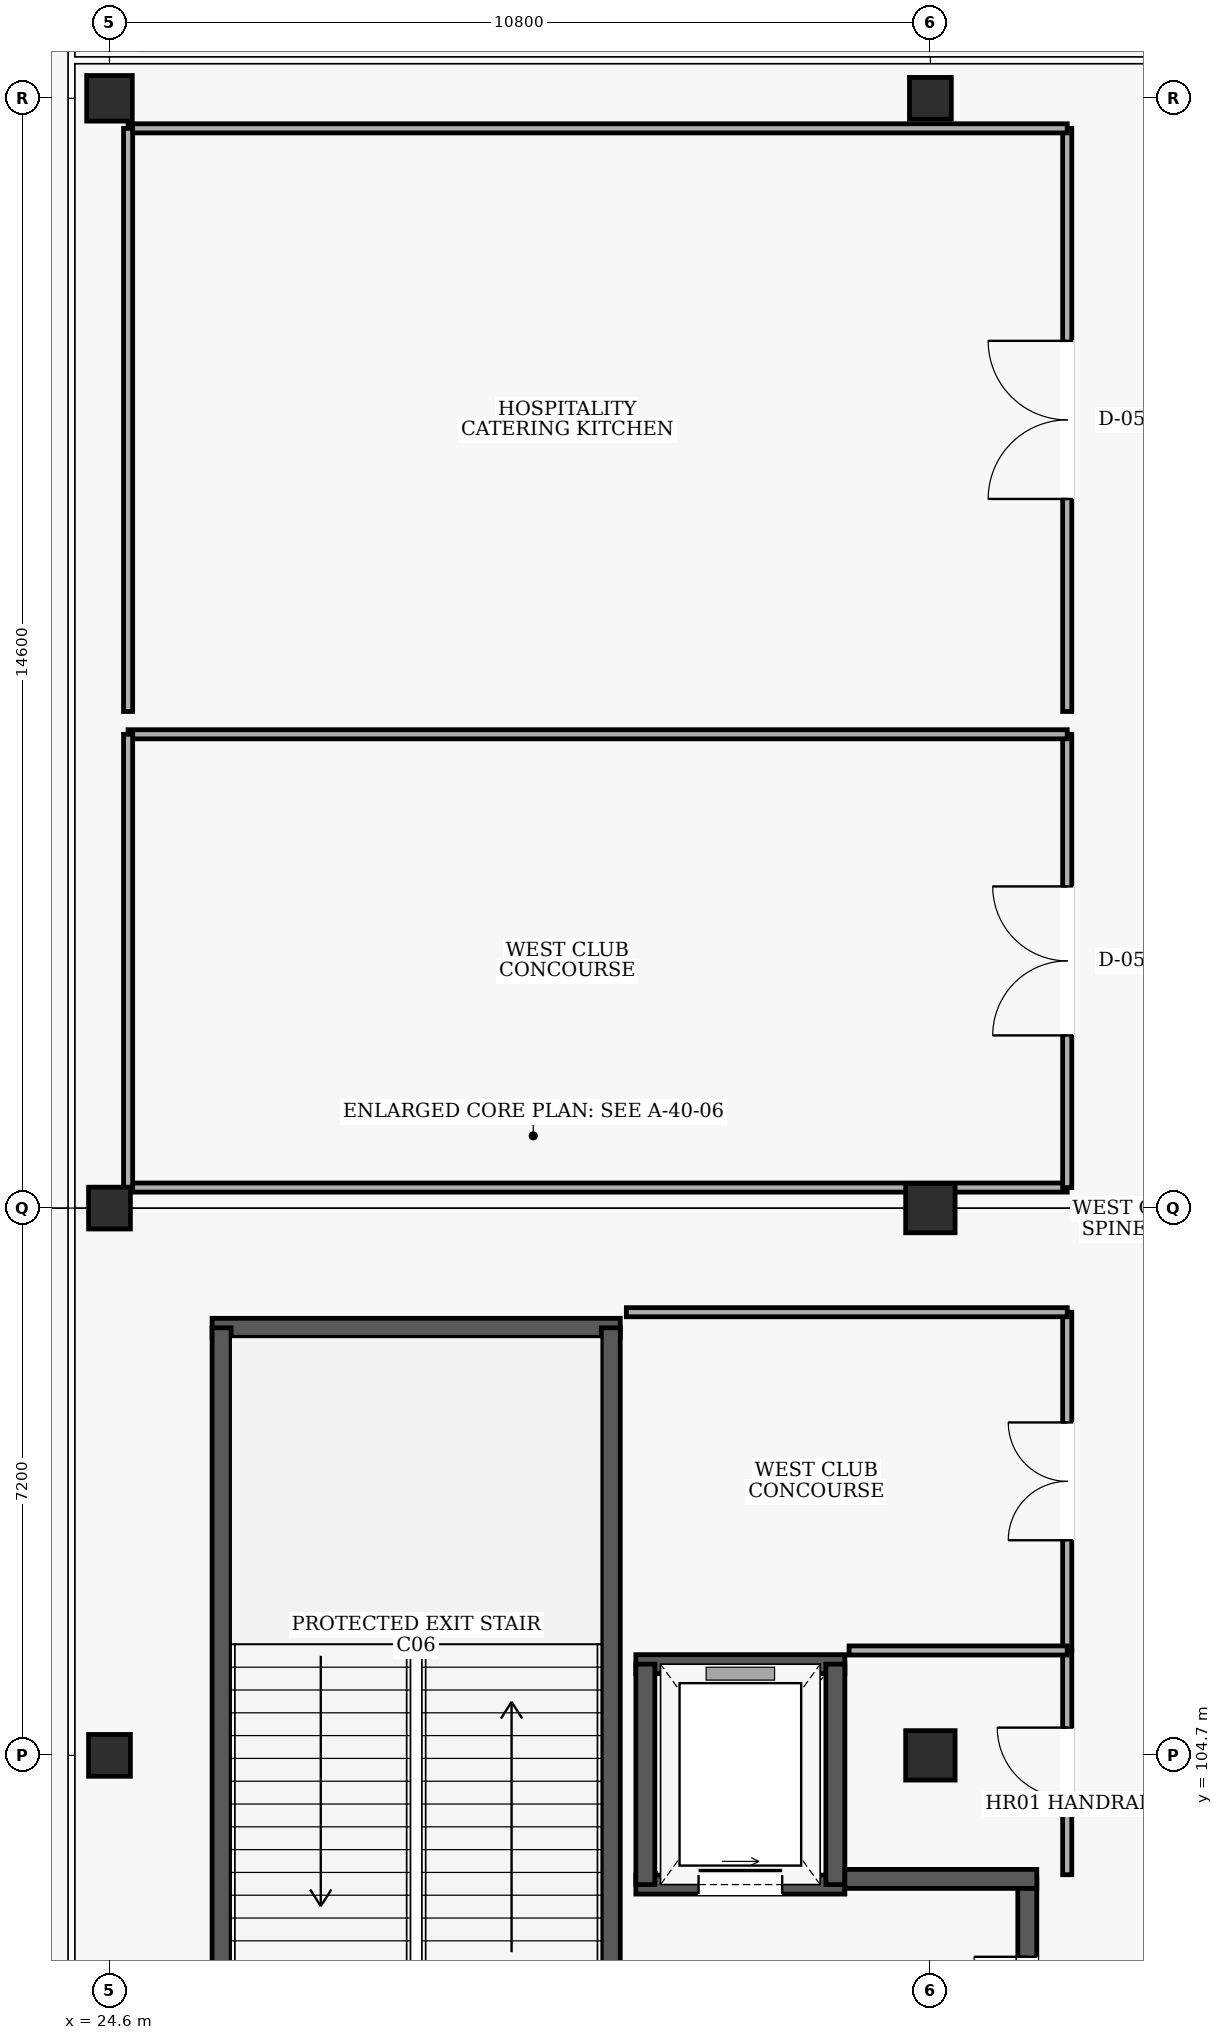
"""IFC4 building model, lengths in metres.
Left out: names, types, materials, properties, quantities, classifications, styles, units other than length and angle.
Written with IfcOpenShell. Run it as: python <this file> out.ifc"""

import sys

from ifc_helpers import new_model, si_unit, direction, frame, frame_2d, origin, origin_2d, place, context, subcontext, project, spatial, rectangle, extrude, element, fill, save


model = new_model("IFC4")
c1 = context("Model", 3, precision=1e-05, world=origin(), true_north=direction((0.0, 1.0)))
c2 = subcontext(c1, "Body", "Model", "MODEL_VIEW")
j1 = project(units=[si_unit("LENGTHUNIT", "METRE"), si_unit("PLANEANGLEUNIT", "RADIAN")], contexts=[c1])
p1 = place(None, origin())
s1 = spatial("IfcSite", under=j1, at=p1, CompositionType="ELEMENT")
p2 = place(p1, origin())
s2 = spatial("IfcBuilding", under=s1, at=p2, CompositionType="ELEMENT")
p3 = place(p2, frame((0.0, 0.0, 10.2)))
s3 = spatial("IfcBuildingStorey", under=s2, at=p3, CompositionType="ELEMENT", Elevation=10.2)
for number, where, z_axis, x_axis in (
    (1, (24.6, 104.7, 0.0), (0.0, 0.0, 1.0), (1.0, 0.0, 0.0)),
    (2, (24.6, 111.9, 0.0), (0.0, 0.0, 1.0), (1.0, 0.0, 0.0)),
):
    element("IfcColumn", number, at=place(p3, frame(where, z_axis=z_axis, x_axis=x_axis)), inside=s3, PredefinedType="COLUMN", context=c2, shape_type="SweptSolid", body=[
        extrude(rectangle(XDim=0.55, YDim=0.55, at=origin_2d()), origin(), (0.0, 0.0, 1.0), 4.8),
    ])
p4 = place(p3, frame((24.6, 126.5, 0.0), z_axis=(0.0, 0.0, 1.0), x_axis=(1.0, 0.0, 0.0)))
e3 = element("IfcColumn", 3, at=p4, inside=s3, PredefinedType="COLUMN", context=c2, shape_type="SweptSolid", body=[
    extrude(rectangle(XDim=0.6, YDim=0.6, at=origin_2d()), origin(), (0.0, 0.0, 1.0), 4.8),
])
for number, where, z_axis, x_axis in (
    (4, (35.4, 104.7, 0.0), (0.0, 0.0, 1.0), (1.0, 0.0, 0.0)),
    (5, (35.4, 111.9, 0.0), (0.0, 0.0, 1.0), (1.0, 0.0, 0.0)),
):
    element("IfcColumn", number, at=place(p3, frame(where, z_axis=z_axis, x_axis=x_axis)), inside=s3, PredefinedType="COLUMN", context=c2, shape_type="SweptSolid", body=[
        extrude(rectangle(XDim=0.65, YDim=0.65, at=origin_2d()), origin(), (0.0, 0.0, 1.0), 4.8),
    ])
p5 = place(p3, frame((35.4, 126.5, 0.0), z_axis=(0.0, 0.0, 1.0), x_axis=(1.0, 0.0, 0.0)))
e6 = element("IfcColumn", 6, at=p5, inside=s3, PredefinedType="COLUMN", context=c2, shape_type="SweptSolid", body=[
    extrude(rectangle(XDim=0.55, YDim=0.55, at=origin_2d()), origin(), (0.0, 0.0, 1.0), 4.8),
])
p6 = place(p3, frame((31.32, 110.325, 0.0), z_axis=(0.0, 0.0, 1.0), x_axis=(-1.0, 0.0, 0.0)))
e7 = element("IfcWall", 7, at=p6, inside=s3, PredefinedType="SHEAR", context=c2, shape_type="SweptSolid", body=[
    extrude(rectangle(XDim=5.37, YDim=0.25, at=frame_2d((2.685, 0.0))), origin(), (0.0, 0.0, 1.0), 4.48),
])
p7 = place(p3, frame((26.075, 99.475, 0.0), z_axis=(0.0, 0.0, 1.0), x_axis=(0.0, 1.0, 0.0)))
e8 = element("IfcWall", 8, at=p7, inside=s3, PredefinedType="SHEAR", context=c2, shape_type="SweptSolid", body=[
    extrude(rectangle(XDim=10.85, YDim=0.25, at=frame_2d((5.425, 0.0))), origin(), (0.0, 0.0, 1.0), 4.48),
])
p8 = place(p3, frame((31.195, 99.475, 0.0), z_axis=(0.0, 0.0, 1.0), x_axis=(0.0, 1.0, 0.0)))
e9 = element("IfcWall", 9, at=p8, inside=s3, PredefinedType="SHEAR", context=c2, shape_type="SweptSolid", body=[
    extrude(rectangle(XDim=10.85, YDim=0.25, at=frame_2d((5.425, 0.0))), origin(), (0.0, 0.0, 1.0), 4.48),
])
p9 = place(p8, frame((0.52, 0.0, 0.0)))
e10 = element("IfcOpeningElement", 10, at=p9, cuts=e9, PredefinedType="OPENING", context=c2, shape_type="SweptSolid", body=[
    extrude(rectangle(XDim=1.4, YDim=2.15, at=frame_2d((0.7, 1.075))), frame((0.0, 0.135, 0.0), z_axis=(0.0, -1.0, 0.0), x_axis=(1.0, 0.0, 0.0)), (0.0, 0.0, 1.0), 0.27),
])
p10 = place(p3, frame((31.525, 103.0, 0.0), z_axis=(0.0, 0.0, 1.0), x_axis=(1.0, 0.0, 0.0)))
e11 = element("IfcWall", 11, at=p10, inside=s3, PredefinedType="SHEAR", context=c2, shape_type="SweptSolid", body=[
    extrude(rectangle(XDim=2.75, YDim=0.25, at=frame_2d((1.375, 0.0))), origin(), (0.0, 0.0, 1.0), 4.48),
])
p11 = place(p10, frame((0.825, 0.0, 0.0)))
e12 = element("IfcOpeningElement", 12, at=p11, cuts=e11, PredefinedType="OPENING", context=c2, shape_type="SweptSolid", body=[
    extrude(rectangle(XDim=1.1, YDim=2.15, at=frame_2d((0.55, 1.075))), frame((0.0, 0.135, 0.0), z_axis=(0.0, -1.0, 0.0), x_axis=(1.0, 0.0, 0.0)), (0.0, 0.0, 1.0), 0.27),
])
p12 = place(p3, frame((34.275, 105.9, 0.0), z_axis=(0.0, 0.0, 1.0), x_axis=(-1.0, 0.0, 0.0)))
e13 = element("IfcWall", 13, at=p12, inside=s3, PredefinedType="SHEAR", context=c2, shape_type="SweptSolid", body=[
    extrude(rectangle(XDim=2.75, YDim=0.25, at=frame_2d((1.375, 0.0))), origin(), (0.0, 0.0, 1.0), 4.48),
])
for number, where, z_axis, x_axis in (
    (14, (31.65, 105.9, 0.0), (0.0, 0.0, 1.0), (0.0, -1.0, 0.0)),
    (15, (34.15, 103.0, 0.0), (0.0, 0.0, 1.0), (0.0, 1.0, 0.0)),
):
    element("IfcWall", number, at=place(p3, frame(where, z_axis=z_axis, x_axis=x_axis)), inside=s3, PredefinedType="SHEAR", context=c2, shape_type="SweptSolid", body=[
        extrude(rectangle(XDim=2.9, YDim=0.25, at=frame_2d((1.45, 0.0))), origin(), (0.0, 0.0, 1.0), 4.48),
    ])
p13 = place(p3, frame((36.675, 99.625, 0.0), z_axis=(0.0, 0.0, 1.0), x_axis=(0.0, 1.0, 0.0)))
e16 = element("IfcWall", 16, at=p13, inside=s3, PredefinedType="SHEAR", context=c2, shape_type="SweptSolid", body=[
    extrude(rectangle(XDim=3.45, YDim=0.25, at=frame_2d((1.725, 0.0))), origin(), (0.0, 0.0, 1.0), 4.48),
])
p14 = place(p13, frame((1.025, 0.0, 0.0)))
e17 = element("IfcOpeningElement", 17, at=p14, cuts=e16, PredefinedType="OPENING", context=c2, shape_type="SweptSolid", body=[
    extrude(rectangle(XDim=1.4, YDim=2.15, at=frame_2d((0.7, 1.075))), frame((0.0, 0.135, 0.0), z_axis=(0.0, -1.0, 0.0), x_axis=(1.0, 0.0, 0.0)), (0.0, 0.0, 1.0), 0.27),
])
p15 = place(p3, frame((34.275, 103.075, 0.0), z_axis=(0.0, 0.0, 1.0), x_axis=(1.0, 0.0, 0.0)))
e18 = element("IfcWall", 18, at=p15, inside=s3, PredefinedType="SHEAR", context=c2, shape_type="SweptSolid", body=[
    extrude(rectangle(XDim=2.525, YDim=0.25, at=frame_2d((1.263, 0.0))), origin(), (0.0, 0.0, 1.0), 4.48),
])
p16 = place(p3, frame((37.2, 106.08, 0.0), z_axis=(0.0, 0.0, 1.0), x_axis=(0.0, 1.0, 0.0)))
e19 = element("IfcWall", 19, at=p16, inside=s3, PredefinedType="PARTITIONING", context=c2, shape_type="SweptSolid", body=[
    extrude(rectangle(XDim=4.45, YDim=0.12, at=frame_2d((2.225, 0.0))), origin(), (0.0, 0.0, 1.0), 4.48),
])
p17 = place(p16, frame((1.45, 0.0, 0.0)))
e20 = element("IfcOpeningElement", 20, at=p17, cuts=e19, PredefinedType="OPENING", context=c2, shape_type="SweptSolid", body=[
    extrude(rectangle(XDim=1.55, YDim=2.2, at=frame_2d((0.775, 1.1))), frame((0.0, 0.07, 0.0), z_axis=(0.0, -1.0, 0.0), x_axis=(1.0, 0.0, 0.0)), (0.0, 0.0, 1.0), 0.14),
])
p18 = place(p3, frame((37.2, 110.53, 0.0), z_axis=(0.0, 0.0, 1.0), x_axis=(-1.0, 0.0, 0.0)))
e21 = element("IfcWall", 21, at=p18, inside=s3, PredefinedType="PARTITIONING", context=c2, shape_type="SweptSolid", body=[
    extrude(rectangle(XDim=5.8, YDim=0.12, at=frame_2d((2.9, 0.0))), origin(), (0.0, 0.0, 1.0), 4.48),
])
p19 = place(p3, frame((37.2, 103.13, 0.0), z_axis=(0.0, 0.0, 1.0), x_axis=(0.0, 1.0, 0.0)))
e22 = element("IfcWall", 22, at=p19, inside=s3, PredefinedType="PARTITIONING", context=c2, shape_type="SweptSolid", body=[
    extrude(rectangle(XDim=2.95, YDim=0.12, at=frame_2d((1.475, 0.0))), origin(), (0.0, 0.0, 1.0), 4.48),
])
p20 = place(p19, frame((1.015, 0.0, 0.0)))
e23 = element("IfcOpeningElement", 23, at=p20, cuts=e22, PredefinedType="OPENING", context=c2, shape_type="SweptSolid", body=[
    extrude(rectangle(XDim=0.92, YDim=2.1, at=frame_2d((0.46, 1.05))), frame((0.0, 0.07, 0.0), z_axis=(0.0, -1.0, 0.0), x_axis=(1.0, 0.0, 0.0)), (0.0, 0.0, 1.0), 0.14),
])
p21 = place(p3, frame((37.2, 106.08, 0.0), z_axis=(0.0, 0.0, 1.0), x_axis=(-1.0, 0.0, 0.0)))
e24 = element("IfcWall", 24, at=p21, inside=s3, PredefinedType="PARTITIONING", context=c2, shape_type="SweptSolid", body=[
    extrude(rectangle(XDim=2.87, YDim=0.12, at=frame_2d((1.435, 0.0))), origin(), (0.0, 0.0, 1.0), 4.48),
])
p22 = place(p3, frame((24.845, 112.17, 0.0), z_axis=(0.0, 0.0, 1.0), x_axis=(1.0, 0.0, 0.0)))
e25 = element("IfcWall", 25, at=p22, inside=s3, PredefinedType="PARTITIONING", context=c2, shape_type="SweptSolid", body=[
    extrude(rectangle(XDim=12.355, YDim=0.12, at=frame_2d((6.177, 0.0))), origin(), (0.0, 0.0, 1.0), 3.76),
])
p23 = place(p3, frame((37.2, 112.17, 0.0), z_axis=(0.0, 0.0, 1.0), x_axis=(0.0, 1.0, 0.0)))
e26 = element("IfcWall", 26, at=p23, inside=s3, PredefinedType="PARTITIONING", context=c2, shape_type="SweptSolid", body=[
    extrude(rectangle(XDim=5.963, YDim=0.12, at=frame_2d((2.982, 0.0))), origin(), (0.0, 0.0, 1.0), 4.48),
])
p24 = place(p23, frame((2.002, 0.0, 0.0)))
e27 = element("IfcOpeningElement", 27, at=p24, cuts=e26, PredefinedType="OPENING", context=c2, shape_type="SweptSolid", body=[
    extrude(rectangle(XDim=1.96, YDim=2.3, at=frame_2d((0.98, 1.15))), frame((0.0, 0.07, 0.0), z_axis=(0.0, -1.0, 0.0), x_axis=(1.0, 0.0, 0.0)), (0.0, 0.0, 1.0), 0.14),
])
p25 = place(p3, frame((37.2, 118.133, 0.0), z_axis=(0.0, 0.0, 1.0), x_axis=(-1.0, 0.0, 0.0)))
e28 = element("IfcWall", 28, at=p25, inside=s3, PredefinedType="PARTITIONING", context=c2, shape_type="SweptSolid", body=[
    extrude(rectangle(XDim=12.355, YDim=0.12, at=frame_2d((6.177, 0.0))), origin(), (0.0, 0.0, 1.0), 4.48),
])
p26 = place(p3, frame((24.845, 118.133, 0.0), z_axis=(0.0, 0.0, 1.0), x_axis=(0.0, -1.0, 0.0)))
e29 = element("IfcWall", 29, at=p26, inside=s3, PredefinedType="PARTITIONING", context=c2, shape_type="SweptSolid", body=[
    extrude(rectangle(XDim=5.963, YDim=0.12, at=frame_2d((2.982, 0.0))), origin(), (0.0, 0.0, 1.0), 3.56),
])
p27 = place(p3, frame((37.2, 118.433, 0.0), z_axis=(0.0, 0.0, 1.0), x_axis=(0.0, 1.0, 0.0)))
e30 = element("IfcWall", 30, at=p27, inside=s3, PredefinedType="PARTITIONING", context=c2, shape_type="SweptSolid", body=[
    extrude(rectangle(XDim=7.672, YDim=0.12, at=frame_2d((3.836, 0.0))), origin(), (0.0, 0.0, 1.0), 4.48),
])
p28 = place(p27, frame((2.796, 0.0, 0.0)))
e31 = element("IfcOpeningElement", 31, at=p28, cuts=e30, PredefinedType="OPENING", context=c2, shape_type="SweptSolid", body=[
    extrude(rectangle(XDim=2.08, YDim=2.35, at=frame_2d((1.04, 1.175))), frame((0.0, 0.07, 0.0), z_axis=(0.0, -1.0, 0.0), x_axis=(1.0, 0.0, 0.0)), (0.0, 0.0, 1.0), 0.14),
])
p29 = place(p3, frame((37.2, 126.105, 0.0), z_axis=(0.0, 0.0, 1.0), x_axis=(-1.0, 0.0, 0.0)))
e32 = element("IfcWall", 32, at=p29, inside=s3, PredefinedType="PARTITIONING", context=c2, shape_type="SweptSolid", body=[
    extrude(rectangle(XDim=12.355, YDim=0.12, at=frame_2d((6.177, 0.0))), origin(), (0.0, 0.0, 1.0), 3.76),
])
p30 = place(p3, frame((24.845, 126.105, 0.0), z_axis=(0.0, 0.0, 1.0), x_axis=(0.0, -1.0, 0.0)))
e33 = element("IfcWall", 33, at=p30, inside=s3, PredefinedType="PARTITIONING", context=c2, shape_type="SweptSolid", body=[
    extrude(rectangle(XDim=7.672, YDim=0.12, at=frame_2d((3.836, 0.0))), origin(), (0.0, 0.0, 1.0), 3.56),
])
p31 = place(p11, origin())
e34 = element("IfcDoor", 34, at=p31, inside=s3, OperationType="SLIDING_TO_LEFT", PredefinedType="DOOR", context=c2, shape_type="SweptSolid", body=[
    extrude(rectangle(XDim=1.1, YDim=2.15, at=frame_2d((0.55, 1.075))), frame((0.0, 0.025, 0.0), z_axis=(0.0, -1.0, 0.0), x_axis=(1.0, 0.0, 0.0)), (0.0, 0.0, 1.0), 0.05),
])
fill(e12, e34)
p32 = place(p14, origin())
e35 = element("IfcDoor", 35, at=p32, inside=s3, OperationType="DOUBLE_DOOR_SINGLE_SWING", PredefinedType="DOOR", context=c2, shape_type="SweptSolid", body=[
    extrude(rectangle(XDim=1.4, YDim=2.15, at=frame_2d((0.7, 1.075))), frame((0.0, 0.025, 0.0), z_axis=(0.0, -1.0, 0.0), x_axis=(1.0, 0.0, 0.0)), (0.0, 0.0, 1.0), 0.05),
])
fill(e17, e35)
p33 = place(p17, origin())
e36 = element("IfcDoor", 36, at=p33, inside=s3, OperationType="DOUBLE_DOOR_SINGLE_SWING", PredefinedType="DOOR", context=c2, shape_type="SweptSolid", body=[
    extrude(rectangle(XDim=1.55, YDim=2.2, at=frame_2d((0.775, 1.1))), frame((0.0, 0.025, 0.0), z_axis=(0.0, -1.0, 0.0), x_axis=(1.0, 0.0, 0.0)), (0.0, 0.0, 1.0), 0.05),
])
fill(e20, e36)
p34 = place(p20, origin())
e37 = element("IfcDoor", 37, at=p34, inside=s3, OperationType="SINGLE_SWING_RIGHT", PredefinedType="DOOR", context=c2, shape_type="SweptSolid", body=[
    extrude(rectangle(XDim=0.92, YDim=2.1, at=frame_2d((0.46, 1.05))), frame((0.0, 0.025, 0.0), z_axis=(0.0, -1.0, 0.0), x_axis=(1.0, 0.0, 0.0)), (0.0, 0.0, 1.0), 0.05),
])
fill(e23, e37)
p35 = place(p24, origin())
e38 = element("IfcDoor", 38, at=p35, inside=s3, OperationType="DOUBLE_DOOR_SINGLE_SWING", PredefinedType="DOOR", context=c2, shape_type="SweptSolid", body=[
    extrude(rectangle(XDim=1.96, YDim=2.3, at=frame_2d((0.98, 1.15))), frame((0.0, 0.025, 0.0), z_axis=(0.0, -1.0, 0.0), x_axis=(1.0, 0.0, 0.0)), (0.0, 0.0, 1.0), 0.05),
])
fill(e27, e38)
p36 = place(p28, origin())
e39 = element("IfcDoor", 39, at=p36, inside=s3, OperationType="DOUBLE_DOOR_SINGLE_SWING", PredefinedType="DOOR", context=c2, shape_type="SweptSolid", body=[
    extrude(rectangle(XDim=2.08, YDim=2.35, at=frame_2d((1.04, 1.175))), frame((0.0, 0.025, 0.0), z_axis=(0.0, -1.0, 0.0), x_axis=(1.0, 0.0, 0.0)), (0.0, 0.0, 1.0), 0.05),
])
fill(e31, e39)
save(model, sys.argv[1])
